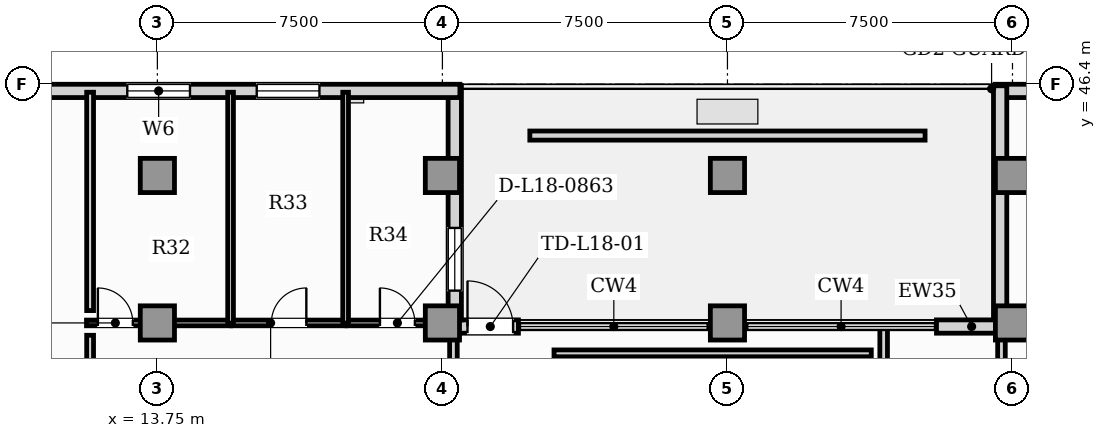
"""IFC4 building model, lengths in metres.
Left out: names, types, materials, properties, quantities, classifications, styles, units other than length and angle.
Written with IfcOpenShell. Run it as: python <this file> out.ifc"""

import sys

from ifc_helpers import new_model, si_unit, direction, frame, frame_2d, origin, origin_2d, place, context, subcontext, project, spatial, rectangle, extrude, element, fill, save


model = new_model("IFC4")
c1 = context("Model", 3, precision=1e-05, world=origin(), true_north=direction((0.0, 1.0)))
c2 = subcontext(c1, "Body", "Model", "MODEL_VIEW")
j1 = project(units=[si_unit("LENGTHUNIT", "METRE"), si_unit("PLANEANGLEUNIT", "RADIAN")], contexts=[c1])
p1 = place(None, origin())
s1 = spatial("IfcSite", under=j1, at=p1, CompositionType="ELEMENT")
p2 = place(p1, origin())
s2 = spatial("IfcBuilding", under=s1, at=p2, CompositionType="ELEMENT")
p3 = place(p2, frame((0.0, 0.0, 76.0)))
s3 = spatial("IfcBuildingStorey", under=s2, at=p3, CompositionType="ELEMENT", Elevation=76.0)
for number, where, z_axis, x_axis in (
    (1, (13.75, 44.0, 0.0), (0.0, 0.0, 1.0), (1.0, 0.0, 0.0)),
    (2, (21.25, 44.0, 0.0), (0.0, 0.0, 1.0), (1.0, 0.0, 0.0)),
    (3, (28.75, 44.0, 0.0), (0.0, 0.0, 1.0), (1.0, 0.0, 0.0)),
    (4, (36.25, 44.0, 0.0), (0.0, 0.0, 1.0), (1.0, 0.0, 0.0)),
    (5, (13.75, 40.12, 0.0), (0.0, 0.0, 1.0), (1.0, 0.0, 0.0)),
    (6, (21.25, 40.12, 0.0), (0.0, 0.0, 1.0), (1.0, 0.0, 0.0)),
    (7, (28.75, 40.12, 0.0), (0.0, 0.0, 1.0), (1.0, 0.0, 0.0)),
    (8, (36.25, 40.12, 0.0), (0.0, 0.0, 1.0), (1.0, 0.0, 0.0)),
):
    element("IfcColumn", number, at=place(p3, frame(where, z_axis=z_axis, x_axis=x_axis)), inside=s3, PredefinedType="COLUMN", context=c2, shape_type="SweptSolid", body=[
        extrude(rectangle(XDim=0.9, YDim=0.9, at=origin_2d()), origin(), (0.0, 0.0, 1.0), 5.05),
    ])
p4 = place(p3, frame((54.26, 46.225, 0.0), z_axis=(0.0, 0.0, 1.0), x_axis=(-1.0, 0.0, 0.0)))
e9 = element("IfcWall", 9, at=p4, inside=s3, PredefinedType="SOLIDWALL", context=c2, shape_type="SweptSolid", body=[
    extrude(rectangle(XDim=18.47, YDim=0.35, at=frame_2d((9.235, 0.0))), origin(), (0.0, 0.0, 1.0), 4.8),
])
p5 = place(p4, frame((14.207, 0.0, 0.88)))
e10 = element("IfcOpeningElement", 10, at=p5, cuts=e9, PredefinedType="OPENING", context=c2, shape_type="SweptSolid", body=[
    extrude(rectangle(XDim=1.65, YDim=2.0, at=frame_2d((0.825, 1.0))), frame((0.0, 0.185, 0.0), z_axis=(0.0, -1.0, 0.0), x_axis=(1.0, 0.0, 0.0)), (0.0, 0.0, 1.0), 0.37),
])
p6 = place(p4, frame((9.964, 0.0, 0.88)))
e11 = element("IfcOpeningElement", 11, at=p6, cuts=e9, PredefinedType="OPENING", context=c2, shape_type="SweptSolid", body=[
    extrude(rectangle(XDim=1.65, YDim=2.0, at=frame_2d((0.825, 1.0))), frame((0.0, 0.185, 0.0), z_axis=(0.0, -1.0, 0.0), x_axis=(1.0, 0.0, 0.0)), (0.0, 0.0, 1.0), 0.37),
])
p7 = place(p3, frame((35.925, 46.36, 0.0), z_axis=(0.0, 0.0, 1.0), x_axis=(0.0, -1.0, 0.0)))
e12 = element("IfcWall", 12, at=p7, inside=s3, PredefinedType="SOLIDWALL", context=c2, shape_type="SweptSolid", body=[
    extrude(rectangle(XDim=6.16, YDim=0.35, at=frame_2d((3.08, 0.0))), origin(), (0.0, 0.0, 1.0), 4.8),
])
p8 = place(p3, frame((21.4, 40.025, 0.0), z_axis=(0.0, 0.0, 1.0), x_axis=(1.0, 0.0, 0.0)))
e13 = element("IfcWall", 13, at=p8, inside=s3, PredefinedType="SOLIDWALL", context=c2, shape_type="SweptSolid", body=[
    extrude(rectangle(XDim=1.85, YDim=0.35, at=frame_2d((0.925, 0.0))), origin(), (0.0, 0.0, 1.0), 4.8),
])
p9 = place(p8, frame((0.51, 0.0, 0.0)))
e14 = element("IfcOpeningElement", 14, at=p9, cuts=e13, PredefinedType="OPENING", context=c2, shape_type="SweptSolid", body=[
    extrude(rectangle(XDim=1.2, YDim=2.2, at=frame_2d((0.6, 1.1))), frame((0.0, 0.185, 0.0), z_axis=(0.0, -1.0, 0.0), x_axis=(1.0, 0.0, 0.0)), (0.0, 0.0, 1.0), 0.37),
])
p10 = place(p3, frame((34.25, 40.025, 0.0), z_axis=(0.0, 0.0, 1.0), x_axis=(1.0, 0.0, 0.0)))
e15 = element("IfcWall", 15, at=p10, inside=s3, PredefinedType="SOLIDWALL", context=c2, shape_type="SweptSolid", body=[
    extrude(rectangle(XDim=1.85, YDim=0.35, at=frame_2d((0.925, 0.0))), origin(), (0.0, 0.0, 1.0), 4.8),
])
p11 = place(p3, frame((21.575, 40.2, 0.0), z_axis=(0.0, 0.0, 1.0), x_axis=(0.0, 1.0, 0.0)))
e16 = element("IfcWall", 16, at=p11, inside=s3, PredefinedType="SOLIDWALL", context=c2, shape_type="SweptSolid", body=[
    extrude(rectangle(XDim=6.16, YDim=0.35, at=frame_2d((3.08, 0.0))), origin(), (0.0, 0.0, 1.0), 4.8),
])
p12 = place(p11, frame((0.77, 0.0, 0.88)))
e17 = element("IfcOpeningElement", 17, at=p12, cuts=e16, PredefinedType="OPENING", context=c2, shape_type="SweptSolid", body=[
    extrude(rectangle(XDim=1.65, YDim=2.0, at=frame_2d((0.825, 1.0))), frame((0.0, 0.185, 0.0), z_axis=(0.0, -1.0, 0.0), x_axis=(1.0, 0.0, 0.0)), (0.0, 0.0, 1.0), 0.37),
])
p13 = place(p3, frame((21.71, 46.225, 0.0), z_axis=(0.0, 0.0, 1.0), x_axis=(-1.0, 0.0, 0.0)))
e18 = element("IfcWall", 18, at=p13, inside=s3, PredefinedType="SOLIDWALL", context=c2, shape_type="SweptSolid", body=[
    extrude(rectangle(XDim=18.47, YDim=0.35, at=frame_2d((9.235, 0.0))), origin(), (0.0, 0.0, 1.0), 4.8),
])
p14 = place(p13, frame((13.367, 0.0, 0.85)))
e19 = element("IfcOpeningElement", 19, at=p14, cuts=e18, PredefinedType="OPENING", context=c2, shape_type="SweptSolid", body=[
    extrude(rectangle(XDim=2.4, YDim=2.0, at=frame_2d((1.2, 1.0))), frame((0.0, 0.185, 0.0), z_axis=(0.0, -1.0, 0.0), x_axis=(1.0, 0.0, 0.0)), (0.0, 0.0, 1.0), 0.37),
])
p15 = place(p13, frame((7.102, 0.0, 0.88)))
e20 = element("IfcOpeningElement", 20, at=p15, cuts=e18, PredefinedType="OPENING", context=c2, shape_type="SweptSolid", body=[
    extrude(rectangle(XDim=1.65, YDim=2.0, at=frame_2d((0.825, 1.0))), frame((0.0, 0.185, 0.0), z_axis=(0.0, -1.0, 0.0), x_axis=(1.0, 0.0, 0.0)), (0.0, 0.0, 1.0), 0.37),
])
p16 = place(p13, frame((3.696, 0.0, 0.88)))
e21 = element("IfcOpeningElement", 21, at=p16, cuts=e18, PredefinedType="OPENING", context=c2, shape_type="SweptSolid", body=[
    extrude(rectangle(XDim=1.65, YDim=2.0, at=frame_2d((0.825, 1.0))), frame((0.0, 0.185, 0.0), z_axis=(0.0, -1.0, 0.0), x_axis=(1.0, 0.0, 0.0)), (0.0, 0.0, 1.0), 0.37),
])
p17 = place(p3, frame((23.55, 45.05, 0.0), z_axis=(0.0, 0.0, 1.0), x_axis=(1.0, 0.0, 0.0)))
e22 = element("IfcWall", 22, at=p17, inside=s3, PredefinedType="PARAPET", context=c2, shape_type="SweptSolid", body=[
    extrude(rectangle(XDim=10.4, YDim=0.24, at=frame_2d((5.2, 0.0))), origin(), (0.0, 0.0, 1.0), 0.55),
])
p18 = place(p3, frame((32.86, 17.585, 0.0), z_axis=(0.0, 0.0, 1.0), x_axis=(0.0, 1.0, 0.0)))
e23 = element("IfcWall", 23, at=p18, inside=s3, PredefinedType="PARTITIONING", context=c2, shape_type="SweptSolid", body=[
    extrude(rectangle(XDim=22.422, YDim=0.2, at=frame_2d((11.211, 0.0))), origin(), (0.0, 0.0, 1.0), 4.8),
])
p19 = place(p18, frame((10.751, 0.0, 0.0)))
e24 = element("IfcOpeningElement", 24, at=p19, cuts=e23, PredefinedType="OPENING", context=c2, shape_type="SweptSolid", body=[
    extrude(rectangle(XDim=0.92, YDim=2.1, at=frame_2d((0.46, 1.05))), frame((0.0, 0.11, 0.0), z_axis=(0.0, -1.0, 0.0), x_axis=(1.0, 0.0, 0.0)), (0.0, 0.0, 1.0), 0.22),
])
for number, where, z_axis, x_axis in (
    (25, (21.54, 38.615, 0.0), (0.0, 0.0, 1.0), (0.0, 1.0, 0.0)),
    (26, (35.96, 38.615, 0.0), (0.0, 0.0, 1.0), (0.0, 1.0, 0.0)),
):
    element("IfcWall", number, at=place(p3, frame(where, z_axis=z_axis, x_axis=x_axis)), inside=s3, PredefinedType="PARTITIONING", context=c2, shape_type="SweptSolid", body=[
        extrude(rectangle(XDim=1.375, YDim=0.2, at=frame_2d((0.688, 0.0))), origin(), (0.0, 0.0, 1.0), 4.8),
    ])
p20 = place(p3, frame((11.885, 40.12, 0.0), z_axis=(0.0, 0.0, 1.0), x_axis=(1.0, 0.0, 0.0)))
e27 = element("IfcWall", 27, at=p20, inside=s3, PredefinedType="PARTITIONING", context=c2, shape_type="SweptSolid", body=[
    extrude(rectangle(XDim=3.796, YDim=0.15, at=frame_2d((1.898, 0.0))), origin(), (0.0, 0.0, 1.0), 4.8),
])
p21 = place(p20, frame((0.299, 0.0, 0.0)))
e28 = element("IfcOpeningElement", 28, at=p21, cuts=e27, PredefinedType="OPENING", context=c2, shape_type="SweptSolid", body=[
    extrude(rectangle(XDim=0.92, YDim=2.1, at=frame_2d((0.46, 1.05))), frame((0.0, 0.085, 0.0), z_axis=(0.0, -1.0, 0.0), x_axis=(1.0, 0.0, 0.0)), (0.0, 0.0, 1.0), 0.17),
])
p22 = place(p3, frame((15.711, 40.12, 0.0), z_axis=(0.0, 0.0, 1.0), x_axis=(1.0, 0.0, 0.0)))
e29 = element("IfcWall", 29, at=p22, inside=s3, PredefinedType="PARTITIONING", context=c2, shape_type="SweptSolid", body=[
    extrude(rectangle(XDim=2.997, YDim=0.15, at=frame_2d((1.499, 0.0))), origin(), (0.0, 0.0, 1.0), 4.8),
])
p23 = place(p22, frame((1.039, 0.0, 0.0)))
e30 = element("IfcOpeningElement", 30, at=p23, cuts=e29, PredefinedType="OPENING", context=c2, shape_type="SweptSolid", body=[
    extrude(rectangle(XDim=0.92, YDim=2.1, at=frame_2d((0.46, 1.05))), frame((0.0, 0.085, 0.0), z_axis=(0.0, -1.0, 0.0), x_axis=(1.0, 0.0, 0.0)), (0.0, 0.0, 1.0), 0.17),
])
p24 = place(p3, frame((18.738, 40.12, 0.0), z_axis=(0.0, 0.0, 1.0), x_axis=(1.0, 0.0, 0.0)))
e31 = element("IfcWall", 31, at=p24, inside=s3, PredefinedType="PARTITIONING", context=c2, shape_type="SweptSolid", body=[
    extrude(rectangle(XDim=2.656, YDim=0.15, at=frame_2d((1.328, 0.0))), origin(), (0.0, 0.0, 1.0), 4.8),
])
p25 = place(p24, frame((0.868, 0.0, 0.0)))
e32 = element("IfcOpeningElement", 32, at=p25, cuts=e31, PredefinedType="OPENING", context=c2, shape_type="SweptSolid", body=[
    extrude(rectangle(XDim=0.92, YDim=2.1, at=frame_2d((0.46, 1.05))), frame((0.0, 0.085, 0.0), z_axis=(0.0, -1.0, 0.0), x_axis=(1.0, 0.0, 0.0)), (0.0, 0.0, 1.0), 0.17),
])
for number, where, z_axis, x_axis in (
    (33, (15.676, 40.115, 0.0), (0.0, 0.0, 1.0), (0.0, 1.0, 0.0)),
    (34, (18.703, 40.115, 0.0), (0.0, 0.0, 1.0), (0.0, 1.0, 0.0)),
):
    element("IfcWall", number, at=place(p3, frame(where, z_axis=z_axis, x_axis=x_axis)), inside=s3, PredefinedType="PARTITIONING", context=c2, shape_type="SweptSolid", body=[
        extrude(rectangle(XDim=6.075, YDim=0.15, at=frame_2d((3.038, 0.0))), origin(), (0.0, 0.0, 1.0), 4.8),
    ])
p26 = place(p3, frame((36.107, 40.12, 0.0), z_axis=(0.0, 0.0, 1.0), x_axis=(1.0, 0.0, 0.0)))
e35 = element("IfcWall", 35, at=p26, inside=s3, PredefinedType="PARTITIONING", context=c2, shape_type="SweptSolid", body=[
    extrude(rectangle(XDim=5.23, YDim=0.15, at=frame_2d((2.615, 0.0))), origin(), (0.0, 0.0, 1.0), 4.8),
])
p27 = place(p26, frame((2.155, 0.0, 0.0)))
e36 = element("IfcOpeningElement", 36, at=p27, cuts=e35, PredefinedType="OPENING", context=c2, shape_type="SweptSolid", body=[
    extrude(rectangle(XDim=0.92, YDim=2.1, at=frame_2d((0.46, 1.05))), frame((0.0, 0.085, 0.0), z_axis=(0.0, -1.0, 0.0), x_axis=(1.0, 0.0, 0.0)), (0.0, 0.0, 1.0), 0.17),
])
p28 = place(p3, frame((24.187, 39.32, 0.0), z_axis=(0.0, 0.0, 1.0), x_axis=(1.0, 0.0, 0.0)))
e37 = element("IfcWall", 37, at=p28, inside=s3, PredefinedType="PARTITIONING", context=c2, shape_type="SweptSolid", body=[
    extrude(rectangle(XDim=8.348, YDim=0.18, at=frame_2d((4.174, 0.0))), origin(), (0.0, 0.0, 1.0), 4.8),
])
p29 = place(p3, frame((11.98, 38.945, 0.0), z_axis=(0.0, 0.0, 1.0), x_axis=(0.0, 1.0, 0.0)))
e38 = element("IfcWall", 38, at=p29, inside=s3, PredefinedType="PARTITIONING", context=c2, shape_type="SweptSolid", body=[
    extrude(rectangle(XDim=0.85, YDim=0.18, at=frame_2d((0.425, 0.0))), origin(), (0.0, 0.0, 1.0), 4.8),
])
p30 = place(p3, frame((11.98, 40.445, 0.0), z_axis=(0.0, 0.0, 1.0), x_axis=(0.0, 1.0, 0.0)))
e39 = element("IfcWall", 39, at=p30, inside=s3, PredefinedType="PARTITIONING", context=c2, shape_type="SweptSolid", body=[
    extrude(rectangle(XDim=5.745, YDim=0.18, at=frame_2d((2.873, 0.0))), origin(), (0.0, 0.0, 1.0), 4.8),
])
p31 = place(p9, origin())
e40 = element("IfcDoor", 40, at=p31, inside=s3, OperationType="SINGLE_SWING_LEFT", PredefinedType="DOOR", context=c2, shape_type="SweptSolid", body=[
    extrude(rectangle(XDim=1.2, YDim=2.2, at=frame_2d((0.6, 1.1))), frame((0.0, 0.025, 0.0), z_axis=(0.0, -1.0, 0.0), x_axis=(1.0, 0.0, 0.0)), (0.0, 0.0, 1.0), 0.05),
])
fill(e14, e40)
p32 = place(p15, origin())
e41 = element("IfcWindow", 41, at=p32, inside=s3, PartitioningType="SINGLE_PANEL", PredefinedType="WINDOW", context=c2, shape_type="SweptSolid", body=[
    extrude(rectangle(XDim=1.65, YDim=2.0, at=frame_2d((0.825, 1.0))), frame((0.0, 0.03, 0.0), z_axis=(0.0, -1.0, 0.0), x_axis=(1.0, 0.0, 0.0)), (0.0, 0.0, 1.0), 0.06),
])
fill(e20, e41)
p33 = place(p16, origin())
e42 = element("IfcWindow", 42, at=p33, inside=s3, PartitioningType="SINGLE_PANEL", PredefinedType="WINDOW", context=c2, shape_type="SweptSolid", body=[
    extrude(rectangle(XDim=1.65, YDim=2.0, at=frame_2d((0.825, 1.0))), frame((0.0, 0.03, 0.0), z_axis=(0.0, -1.0, 0.0), x_axis=(1.0, 0.0, 0.0)), (0.0, 0.0, 1.0), 0.06),
])
fill(e21, e42)
p34 = place(p12, origin())
e43 = element("IfcWindow", 43, at=p34, inside=s3, PartitioningType="SINGLE_PANEL", PredefinedType="WINDOW", context=c2, shape_type="SweptSolid", body=[
    extrude(rectangle(XDim=1.65, YDim=2.0, at=frame_2d((0.825, 1.0))), frame((0.0, 0.03, 0.0), z_axis=(0.0, -1.0, 0.0), x_axis=(1.0, 0.0, 0.0)), (0.0, 0.0, 1.0), 0.06),
])
fill(e17, e43)
p35 = place(p21, origin())
e44 = element("IfcDoor", 44, at=p35, inside=s3, OperationType="SINGLE_SWING_LEFT", PredefinedType="DOOR", context=c2, shape_type="SweptSolid", body=[
    extrude(rectangle(XDim=0.92, YDim=2.1, at=frame_2d((0.46, 1.05))), frame((0.0, 0.025, 0.0), z_axis=(0.0, -1.0, 0.0), x_axis=(1.0, 0.0, 0.0)), (0.0, 0.0, 1.0), 0.05),
])
fill(e28, e44)
p36 = place(p23, origin())
e45 = element("IfcDoor", 45, at=p36, inside=s3, OperationType="SINGLE_SWING_RIGHT", PredefinedType="DOOR", context=c2, shape_type="SweptSolid", body=[
    extrude(rectangle(XDim=0.92, YDim=2.1, at=frame_2d((0.46, 1.05))), frame((0.0, 0.025, 0.0), z_axis=(0.0, -1.0, 0.0), x_axis=(1.0, 0.0, 0.0)), (0.0, 0.0, 1.0), 0.05),
])
fill(e30, e45)
p37 = place(p25, origin())
e46 = element("IfcDoor", 46, at=p37, inside=s3, OperationType="SINGLE_SWING_LEFT", PredefinedType="DOOR", context=c2, shape_type="SweptSolid", body=[
    extrude(rectangle(XDim=0.92, YDim=2.1, at=frame_2d((0.46, 1.05))), frame((0.0, 0.025, 0.0), z_axis=(0.0, -1.0, 0.0), x_axis=(1.0, 0.0, 0.0)), (0.0, 0.0, 1.0), 0.05),
])
fill(e32, e46)
save(model, sys.argv[1])
